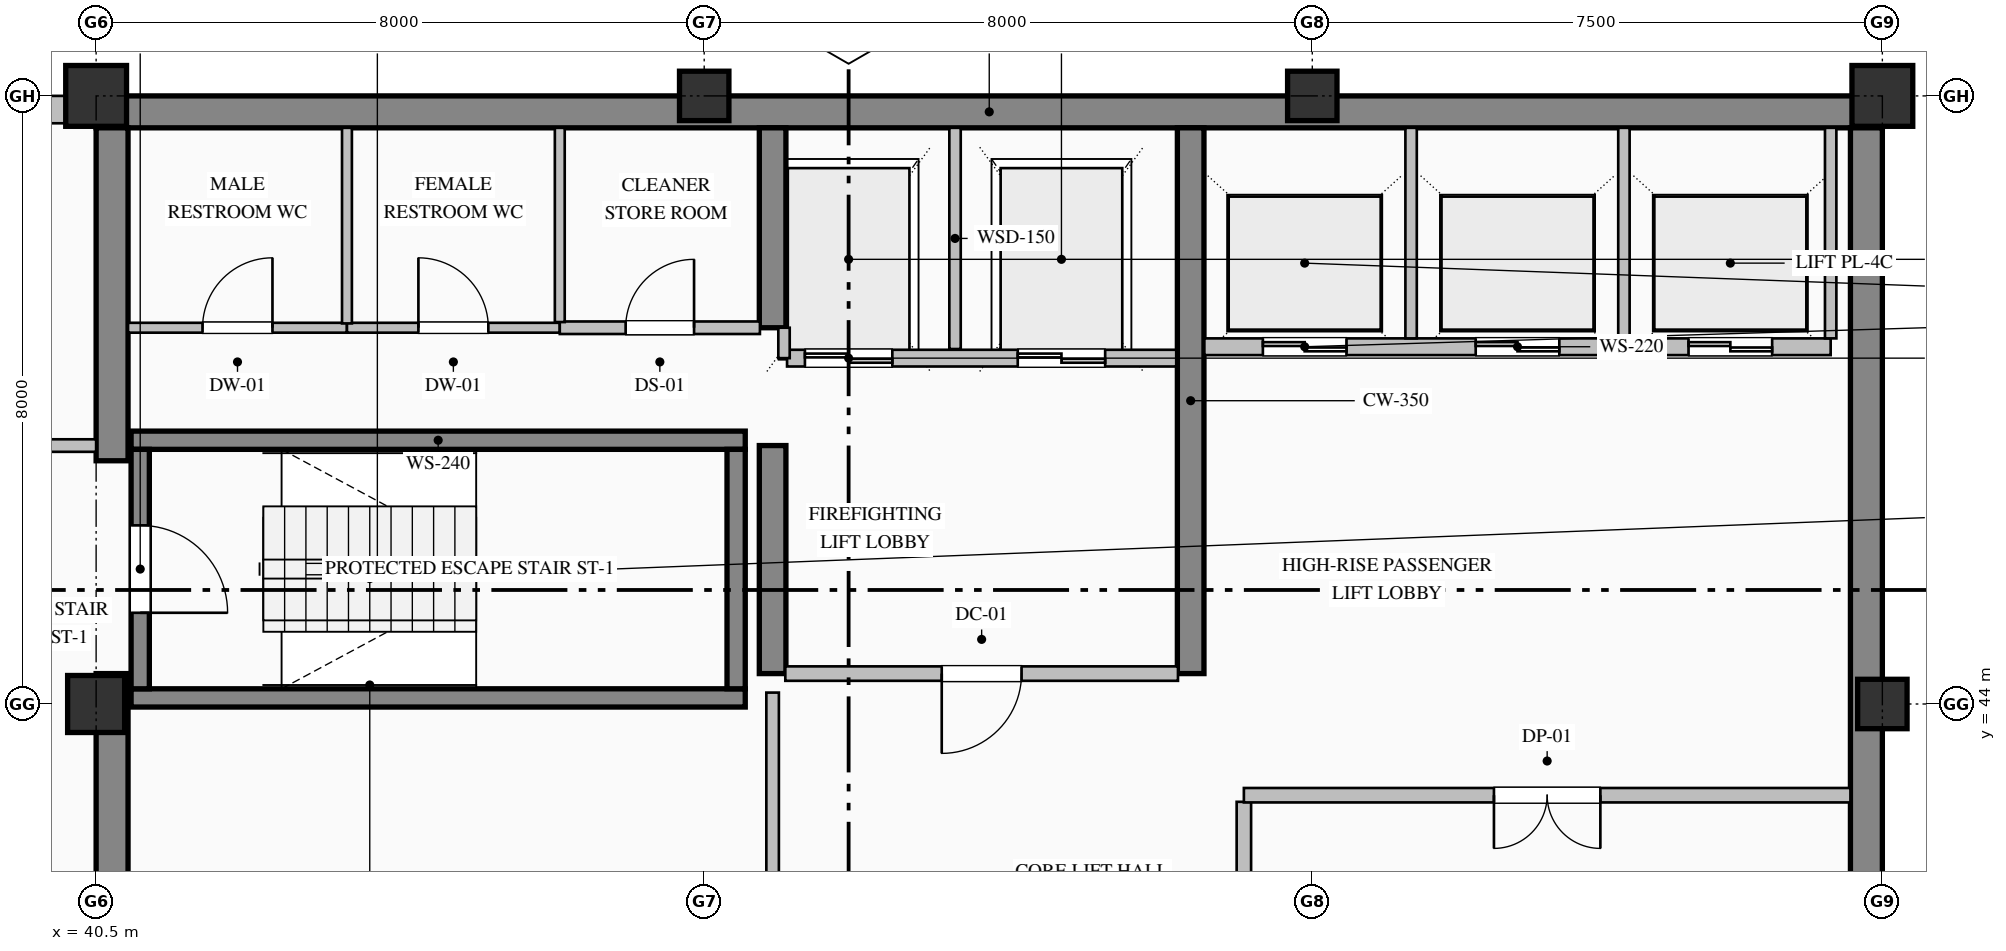
"""IFC4 building model, lengths in metres.
Left out: names, types, materials, properties, quantities, classifications, styles, units other than length and angle.
Written with IfcOpenShell. Run it as: python <this file> out.ifc"""

import sys

from ifc_helpers import new_model, si_unit, direction, frame, frame_2d, origin, origin_2d, place, context, subcontext, project, spatial, rectangle, hollow_rectangle, extrude, element, fill, save


model = new_model("IFC4")
c1 = context("Model", 3, precision=1e-05, world=origin(), true_north=direction((0.0, 1.0)))
c2 = subcontext(c1, "Body", "Model", "MODEL_VIEW")
j1 = project(units=[si_unit("LENGTHUNIT", "METRE"), si_unit("PLANEANGLEUNIT", "RADIAN")], contexts=[c1])
p1 = place(None, origin())
s1 = spatial("IfcSite", under=j1, at=p1, CompositionType="ELEMENT")
p2 = place(p1, origin())
s2 = spatial("IfcBuilding", under=s1, at=p2, CompositionType="ELEMENT")
p3 = place(p2, frame((0.0, 0.0, 303.2)))
s3 = spatial("IfcBuildingStorey", under=s2, at=p3, CompositionType="ELEMENT", Elevation=303.2)
p4 = place(p3, frame((40.5, 51.79, 0.0), z_axis=(0.0, 0.0, 1.0), x_axis=(1.0, 0.0, 0.0)))
e1 = element("IfcWall", 1, at=p4, inside=s3, PredefinedType="SHEAR", context=c2, shape_type="SweptSolid", body=[
    extrude(rectangle(XDim=23.5, YDim=0.42, at=frame_2d((11.75, 0.0))), origin(), (0.0, 0.0, 1.0), 3.785),
])
p5 = place(p3, frame((63.79, 36.32, 0.0), z_axis=(0.0, 0.0, 1.0), x_axis=(0.0, 1.0, 0.0)))
e2 = element("IfcWall", 2, at=p5, inside=s3, PredefinedType="SHEAR", context=c2, shape_type="SweptSolid", body=[
    extrude(rectangle(XDim=15.26, YDim=0.42, at=frame_2d((7.63, 0.0))), origin(), (0.0, 0.0, 1.0), 3.785),
])
p6 = place(p3, frame((40.71, 36.42, 0.0), z_axis=(0.0, 0.0, 1.0), x_axis=(0.0, 1.0, 0.0)))
e3 = element("IfcWall", 3, at=p6, inside=s3, PredefinedType="SHEAR", context=c2, shape_type="SweptSolid", body=[
    extrude(rectangle(XDim=7.98, YDim=0.42, at=frame_2d((3.99, 0.0))), origin(), (0.0, 0.0, 1.0), 3.785),
])
p7 = place(p3, frame((40.71, 47.2, 0.0), z_axis=(0.0, 0.0, 1.0), x_axis=(0.0, 1.0, 0.0)))
e4 = element("IfcWall", 4, at=p7, inside=s3, PredefinedType="SHEAR", context=c2, shape_type="SweptSolid", body=[
    extrude(rectangle(XDim=4.38, YDim=0.42, at=frame_2d((2.19, 0.0))), origin(), (0.0, 0.0, 1.0), 3.785),
])
p8 = place(p3, frame((49.4, 44.4, 0.0), z_axis=(0.0, 0.0, 1.0), x_axis=(0.0, 1.0, 0.0)))
e5 = element("IfcWall", 5, at=p8, inside=s3, PredefinedType="SHEAR", context=c2, shape_type="SweptSolid", body=[
    extrude(rectangle(XDim=3.0, YDim=0.35, at=frame_2d((1.5, 0.0))), origin(), (0.0, 0.0, 1.0), 3.785),
])
p9 = place(p3, frame((49.4, 48.95, 0.0), z_axis=(0.0, 0.0, 1.0), x_axis=(0.0, 1.0, 0.0)))
e6 = element("IfcWall", 6, at=p9, inside=s3, PredefinedType="SHEAR", context=c2, shape_type="SweptSolid", body=[
    extrude(rectangle(XDim=2.63, YDim=0.35, at=frame_2d((1.315, 0.0))), origin(), (0.0, 0.0, 1.0), 3.785),
])
p10 = place(p3, frame((54.9, 44.4, 0.0), z_axis=(0.0, 0.0, 1.0), x_axis=(0.0, 1.0, 0.0)))
e7 = element("IfcWall", 7, at=p10, inside=s3, PredefinedType="SHEAR", context=c2, shape_type="SweptSolid", body=[
    extrude(rectangle(XDim=7.18, YDim=0.35, at=frame_2d((3.59, 0.0))), origin(), (0.0, 0.0, 1.0), 3.785),
])
p11 = place(p3, frame((40.5, 44.0, 0.0), z_axis=(0.0, 0.0, 1.0), x_axis=(1.0, 0.0, 0.0)))
e8 = element("IfcColumn", 8, at=p11, inside=s3, PredefinedType="COLUMN", context=c2, shape_type="SweptSolid", body=[
    extrude(rectangle(XDim=0.75, YDim=0.75, at=origin_2d()), origin(), (0.0, 0.0, 1.0), 4.0),
])
p12 = place(p3, frame((40.5, 52.0, 0.0), z_axis=(0.0, 0.0, 1.0), x_axis=(1.0, 0.0, 0.0)))
e9 = element("IfcColumn", 9, at=p12, inside=s3, PredefinedType="COLUMN", context=c2, shape_type="SweptSolid", body=[
    extrude(hollow_rectangle(XDim=0.8, YDim=0.8, WallThickness=0.032, at=origin_2d()), origin(), (0.0, 0.0, 1.0), 4.0),
])
for number, where, z_axis, x_axis in (
    (10, (48.5, 52.0, 0.0), (0.0, 0.0, 1.0), (1.0, 0.0, 0.0)),
    (11, (56.5, 52.0, 0.0), (0.0, 0.0, 1.0), (1.0, 0.0, 0.0)),
    (12, (64.0, 44.0, 0.0), (0.0, 0.0, 1.0), (1.0, 0.0, 0.0)),
):
    element("IfcColumn", number, at=place(p3, frame(where, z_axis=z_axis, x_axis=x_axis)), inside=s3, PredefinedType="COLUMN", context=c2, shape_type="SweptSolid", body=[
        extrude(hollow_rectangle(XDim=0.65, YDim=0.65, WallThickness=0.028, at=origin_2d()), origin(), (0.0, 0.0, 1.0), 4.0),
    ])
p13 = place(p3, frame((64.0, 52.0, 0.0), z_axis=(0.0, 0.0, 1.0), x_axis=(1.0, 0.0, 0.0)))
e13 = element("IfcColumn", 13, at=p13, inside=s3, PredefinedType="COLUMN", context=c2, shape_type="SweptSolid", body=[
    extrude(hollow_rectangle(XDim=0.8, YDim=0.8, WallThickness=0.032, at=origin_2d()), origin(), (0.0, 0.0, 1.0), 4.0),
])
p14 = place(p3, frame((20.5, 51.82, 0.0), z_axis=(0.0, 0.0, 1.0), x_axis=(1.0, 0.0, 0.0)))
e14 = element("IfcWall", 14, at=p14, inside=s3, PredefinedType="SOLIDWALL", context=c2, shape_type="SweptSolid", body=[
    extrude(rectangle(XDim=20.02, YDim=0.36, at=frame_2d((10.01, 0.0))), origin(), (0.0, 0.0, 1.0), 3.335),
])
p15 = place(p14, frame((6.675, 0.0, 0.8)))
e15 = element("IfcOpeningElement", 15, at=p15, cuts=e14, PredefinedType="OPENING", context=c2, shape_type="SweptSolid", body=[
    extrude(rectangle(XDim=1.05, YDim=2.15, at=frame_2d((0.525, 1.075))), frame((0.0, 0.19, 0.0), z_axis=(0.0, -1.0, 0.0), x_axis=(1.0, 0.0, 0.0)), (0.0, 0.0, 1.0), 0.38),
])
for number, where, z_axis, x_axis in (
    (16, (40.96, 47.47, 0.0), (0.0, 0.0, 1.0), (1.0, 0.0, 0.0)),
    (17, (49.04, 44.08, 0.0), (0.0, 0.0, 1.0), (-1.0, 0.0, 0.0)),
):
    element("IfcWall", number, at=place(p3, frame(where, z_axis=z_axis, x_axis=x_axis)), inside=s3, PredefinedType="SOLIDWALL", context=c2, shape_type="SweptSolid", body=[
        extrude(rectangle(XDim=8.08, YDim=0.24, at=frame_2d((4.04, 0.0))), origin(), (0.0, 0.0, 1.0), 4.0),
    ])
p16 = place(p3, frame((41.08, 47.35, 0.0), z_axis=(0.0, 0.0, 1.0), x_axis=(0.0, -1.0, 0.0)))
e18 = element("IfcWall", 18, at=p16, inside=s3, PredefinedType="SOLIDWALL", context=c2, shape_type="SweptSolid", body=[
    extrude(rectangle(XDim=3.15, YDim=0.24, at=frame_2d((1.575, 0.0))), origin(), (0.0, 0.0, 1.0), 4.0),
])
p17 = place(p16, frame((1.0, 0.0, 0.0)))
e19 = element("IfcOpeningElement", 19, at=p17, cuts=e18, PredefinedType="OPENING", context=c2, shape_type="SweptSolid", body=[
    extrude(rectangle(XDim=1.15, YDim=2.2, at=frame_2d((0.575, 1.1))), frame((0.0, 0.13, 0.0), z_axis=(0.0, -1.0, 0.0), x_axis=(1.0, 0.0, 0.0)), (0.0, 0.0, 1.0), 0.26),
])
p18 = place(p3, frame((48.92, 44.2, 0.0), z_axis=(0.0, 0.0, 1.0), x_axis=(0.0, 1.0, 0.0)))
e20 = element("IfcWall", 20, at=p18, inside=s3, PredefinedType="SOLIDWALL", context=c2, shape_type="SweptSolid", body=[
    extrude(rectangle(XDim=3.15, YDim=0.24, at=frame_2d((1.575, 0.0))), origin(), (0.0, 0.0, 1.0), 4.0),
])
p19 = place(p3, frame((54.71, 48.55, 0.0), z_axis=(0.0, 0.0, 1.0), x_axis=(-1.0, 0.0, 0.0)))
e21 = element("IfcWall", 21, at=p19, inside=s3, PredefinedType="PARTITIONING", context=c2, shape_type="SweptSolid", body=[
    extrude(rectangle(XDim=5.12, YDim=0.22, at=frame_2d((2.56, 0.0))), origin(), (0.0, 0.0, 1.0), 3.785),
])
p20 = place(p19, frame((3.735, 0.0, 0.0)))
e22 = element("IfcOpeningElement", 22, at=p20, cuts=e21, PredefinedType="OPENING", context=c2, shape_type="SweptSolid", body=[
    extrude(rectangle(XDim=1.15, YDim=2.2, at=frame_2d((0.575, 1.1))), frame((0.0, 0.12, 0.0), z_axis=(0.0, -1.0, 0.0), x_axis=(1.0, 0.0, 0.0)), (0.0, 0.0, 1.0), 0.24),
])
p21 = place(p19, frame((0.935, 0.0, 0.0)))
e23 = element("IfcOpeningElement", 23, at=p21, cuts=e21, PredefinedType="OPENING", context=c2, shape_type="SweptSolid", body=[
    extrude(rectangle(XDim=1.15, YDim=2.2, at=frame_2d((0.575, 1.1))), frame((0.0, 0.12, 0.0), z_axis=(0.0, -1.0, 0.0), x_axis=(1.0, 0.0, 0.0)), (0.0, 0.0, 1.0), 0.24),
])
p22 = place(p3, frame((51.8, 48.67, 0.0), z_axis=(0.0, 0.0, 1.0), x_axis=(0.0, 1.0, 0.0)))
e24 = element("IfcWall", 24, at=p22, inside=s3, PredefinedType="PARTITIONING", context=c2, shape_type="SweptSolid", body=[
    extrude(rectangle(XDim=2.91, YDim=0.15, at=frame_2d((1.455, 0.0))), origin(), (0.0, 0.0, 1.0), 3.785),
])
p23 = place(p3, frame((49.55, 48.55, 0.0), z_axis=(0.0, 0.0, 1.0), x_axis=(0.0, 1.0, 0.0)))
e25 = element("IfcWall", 25, at=p23, inside=s3, PredefinedType="PARTITIONING", context=c2, shape_type="SweptSolid", body=[
    extrude(rectangle(XDim=0.4, YDim=0.15, at=frame_2d((0.2, 0.0))), origin(), (0.0, 0.0, 1.0), 3.785),
])
p24 = place(p3, frame((63.32, 48.7, 0.0), z_axis=(0.0, 0.0, 1.0), x_axis=(-1.0, 0.0, 0.0)))
e26 = element("IfcWall", 26, at=p24, inside=s3, PredefinedType="PARTITIONING", context=c2, shape_type="SweptSolid", body=[
    extrude(rectangle(XDim=8.24, YDim=0.22, at=frame_2d((4.12, 0.0))), origin(), (0.0, 0.0, 1.0), 3.785),
])
p25 = place(p24, frame((6.37, 0.0, 0.0)))
e27 = element("IfcOpeningElement", 27, at=p25, cuts=e26, PredefinedType="OPENING", context=c2, shape_type="SweptSolid", body=[
    extrude(rectangle(XDim=1.1, YDim=2.2, at=frame_2d((0.55, 1.1))), frame((0.0, 0.12, 0.0), z_axis=(0.0, -1.0, 0.0), x_axis=(1.0, 0.0, 0.0)), (0.0, 0.0, 1.0), 0.24),
])
p26 = place(p24, frame((3.57, 0.0, 0.0)))
e28 = element("IfcOpeningElement", 28, at=p26, cuts=e26, PredefinedType="OPENING", context=c2, shape_type="SweptSolid", body=[
    extrude(rectangle(XDim=1.1, YDim=2.2, at=frame_2d((0.55, 1.1))), frame((0.0, 0.12, 0.0), z_axis=(0.0, -1.0, 0.0), x_axis=(1.0, 0.0, 0.0)), (0.0, 0.0, 1.0), 0.24),
])
p27 = place(p24, frame((0.77, 0.0, 0.0)))
e29 = element("IfcOpeningElement", 29, at=p27, cuts=e26, PredefinedType="OPENING", context=c2, shape_type="SweptSolid", body=[
    extrude(rectangle(XDim=1.1, YDim=2.2, at=frame_2d((0.55, 1.1))), frame((0.0, 0.12, 0.0), z_axis=(0.0, -1.0, 0.0), x_axis=(1.0, 0.0, 0.0)), (0.0, 0.0, 1.0), 0.24),
])
for number, where, z_axis, x_axis in (
    (30, (57.8, 48.81, 0.0), (0.0, 0.0, 1.0), (0.0, 1.0, 0.0)),
    (31, (60.6, 48.81, 0.0), (0.0, 0.0, 1.0), (0.0, 1.0, 0.0)),
    (32, (63.32, 48.81, 0.0), (0.0, 0.0, 1.0), (0.0, 1.0, 0.0)),
):
    element("IfcWall", number, at=place(p3, frame(where, z_axis=z_axis, x_axis=x_axis)), inside=s3, PredefinedType="PARTITIONING", context=c2, shape_type="SweptSolid", body=[
        extrude(rectangle(XDim=2.77, YDim=0.15, at=frame_2d((1.385, 0.0))), origin(), (0.0, 0.0, 1.0), 3.785),
    ])
p28 = place(p3, frame((37.8, 47.4, 0.0), z_axis=(0.0, 0.0, 1.0), x_axis=(1.0, 0.0, 0.0)))
e33 = element("IfcWall", 33, at=p28, inside=s3, PredefinedType="PARTITIONING", context=c2, shape_type="SweptSolid", body=[
    extrude(rectangle(XDim=2.7, YDim=0.165, at=frame_2d((1.35, 0.0))), origin(), (0.0, 0.0, 1.0), 3.785),
])
p29 = place(p28, frame((0.825, 0.0, 0.0)))
e34 = element("IfcOpeningElement", 34, at=p29, cuts=e33, PredefinedType="OPENING", context=c2, shape_type="SweptSolid", body=[
    extrude(rectangle(XDim=1.05, YDim=2.15, at=frame_2d((0.525, 1.075))), frame((0.0, 0.093, 0.0), z_axis=(0.0, -1.0, 0.0), x_axis=(1.0, 0.0, 0.0)), (0.0, 0.0, 1.0), 0.185),
])
p30 = place(p3, frame((40.92, 48.95, 0.0), z_axis=(0.0, 0.0, 1.0), x_axis=(1.0, 0.0, 0.0)))
e35 = element("IfcWall", 35, at=p30, inside=s3, PredefinedType="PARTITIONING", context=c2, shape_type="SweptSolid", body=[
    extrude(rectangle(XDim=2.88, YDim=0.13, at=frame_2d((1.44, 0.0))), origin(), (0.0, 0.0, 1.0), 3.785),
])
p31 = place(p30, frame((0.98, 0.0, 0.0)))
e36 = element("IfcOpeningElement", 36, at=p31, cuts=e35, PredefinedType="OPENING", context=c2, shape_type="SweptSolid", body=[
    extrude(rectangle(XDim=0.92, YDim=2.15, at=frame_2d((0.46, 1.075))), frame((0.0, 0.075, 0.0), z_axis=(0.0, -1.0, 0.0), x_axis=(1.0, 0.0, 0.0)), (0.0, 0.0, 1.0), 0.15),
])
p32 = place(p3, frame((43.8, 48.95, 0.0), z_axis=(0.0, 0.0, 1.0), x_axis=(1.0, 0.0, 0.0)))
e37 = element("IfcWall", 37, at=p32, inside=s3, PredefinedType="PARTITIONING", context=c2, shape_type="SweptSolid", body=[
    extrude(rectangle(XDim=2.8, YDim=0.13, at=frame_2d((1.4, 0.0))), origin(), (0.0, 0.0, 1.0), 3.785),
])
p33 = place(p32, frame((0.94, 0.0, 0.0)))
e38 = element("IfcOpeningElement", 38, at=p33, cuts=e37, PredefinedType="OPENING", context=c2, shape_type="SweptSolid", body=[
    extrude(rectangle(XDim=0.92, YDim=2.15, at=frame_2d((0.46, 1.075))), frame((0.0, 0.075, 0.0), z_axis=(0.0, -1.0, 0.0), x_axis=(1.0, 0.0, 0.0)), (0.0, 0.0, 1.0), 0.15),
])
p34 = place(p3, frame((46.6, 48.95, 0.0), z_axis=(0.0, 0.0, 1.0), x_axis=(1.0, 0.0, 0.0)))
e39 = element("IfcWall", 39, at=p34, inside=s3, PredefinedType="PARTITIONING", context=c2, shape_type="SweptSolid", body=[
    extrude(rectangle(XDim=2.633, YDim=0.165, at=frame_2d((1.316, 0.0))), origin(), (0.0, 0.0, 1.0), 3.785),
])
p35 = place(p34, frame((0.866, 0.0, 0.0)))
e40 = element("IfcOpeningElement", 40, at=p35, cuts=e39, PredefinedType="OPENING", context=c2, shape_type="SweptSolid", body=[
    extrude(rectangle(XDim=0.9, YDim=2.15, at=frame_2d((0.45, 1.075))), frame((0.0, 0.093, 0.0), z_axis=(0.0, -1.0, 0.0), x_axis=(1.0, 0.0, 0.0)), (0.0, 0.0, 1.0), 0.185),
])
p36 = place(p3, frame((54.733, 44.4, 0.0), z_axis=(0.0, 0.0, 1.0), x_axis=(-1.0, 0.0, 0.0)))
e41 = element("IfcWall", 41, at=p36, inside=s3, PredefinedType="PARTITIONING", context=c2, shape_type="SweptSolid", body=[
    extrude(rectangle(XDim=5.166, YDim=0.19, at=frame_2d((2.583, 0.0))), origin(), (0.0, 0.0, 1.0), 3.785),
])
p37 = place(p36, frame((2.058, 0.0, 0.0)))
e42 = element("IfcOpeningElement", 42, at=p37, cuts=e41, PredefinedType="OPENING", context=c2, shape_type="SweptSolid", body=[
    extrude(rectangle(XDim=1.05, YDim=2.15, at=frame_2d((0.525, 1.075))), frame((0.0, 0.105, 0.0), z_axis=(0.0, -1.0, 0.0), x_axis=(1.0, 0.0, 0.0)), (0.0, 0.0, 1.0), 0.21),
])
p38 = place(p3, frame((49.4, 36.42, 0.0), z_axis=(0.0, 0.0, 1.0), x_axis=(0.0, 1.0, 0.0)))
e43 = element("IfcWall", 43, at=p38, inside=s3, PredefinedType="PARTITIONING", context=c2, shape_type="SweptSolid", body=[
    extrude(rectangle(XDim=7.73, YDim=0.165, at=frame_2d((3.865, 0.0))), origin(), (0.0, 0.0, 1.0), 3.027),
])
p39 = place(p38, frame((3.365, 0.0, 0.0)))
e44 = element("IfcOpeningElement", 44, at=p39, cuts=e43, PredefinedType="OPENING", context=c2, shape_type="SweptSolid", body=[
    extrude(rectangle(XDim=1.0, YDim=2.15, at=frame_2d((0.5, 1.075))), frame((0.0, 0.093, 0.0), z_axis=(0.0, -1.0, 0.0), x_axis=(1.0, 0.0, 0.0)), (0.0, 0.0, 1.0), 0.185),
])
p40 = place(p3, frame((55.6, 42.713, 0.0), z_axis=(0.0, 0.0, 1.0), x_axis=(0.0, -1.0, 0.0)))
e45 = element("IfcWall", 45, at=p40, inside=s3, PredefinedType="PARTITIONING", context=c2, shape_type="SweptSolid", body=[
    extrude(rectangle(XDim=2.731, YDim=0.19, at=frame_2d((1.365, 0.0))), origin(), (0.0, 0.0, 1.0), 3.785),
])
p41 = place(p3, frame((63.58, 42.8, 0.0), z_axis=(0.0, 0.0, 1.0), x_axis=(-1.0, 0.0, 0.0)))
e46 = element("IfcWall", 46, at=p41, inside=s3, PredefinedType="PARTITIONING", context=c2, shape_type="SweptSolid", body=[
    extrude(rectangle(XDim=7.98, YDim=0.19, at=frame_2d((3.99, 0.0))), origin(), (0.0, 0.0, 1.0), 3.785),
])
p42 = place(p41, frame((3.29, 0.0, 0.0)))
e47 = element("IfcOpeningElement", 47, at=p42, cuts=e46, PredefinedType="OPENING", context=c2, shape_type="SweptSolid", body=[
    extrude(rectangle(XDim=1.4, YDim=2.25, at=frame_2d((0.7, 1.125))), frame((0.0, 0.105, 0.0), z_axis=(0.0, -1.0, 0.0), x_axis=(1.0, 0.0, 0.0)), (0.0, 0.0, 1.0), 0.21),
])
p43 = place(p3, frame((43.8, 51.58, 0.0), z_axis=(0.0, 0.0, 1.0), x_axis=(0.0, -1.0, 0.0)))
e48 = element("IfcWall", 48, at=p43, inside=s3, PredefinedType="PARTITIONING", context=c2, shape_type="SweptSolid", body=[
    extrude(rectangle(XDim=2.573, YDim=0.13, at=frame_2d((1.287, 0.0))), origin(), (0.0, 0.0, 1.0), 3.785),
])
p44 = place(p3, frame((46.6, 51.58, 0.0), z_axis=(0.0, 0.0, 1.0), x_axis=(0.0, -1.0, 0.0)))
e49 = element("IfcWall", 49, at=p44, inside=s3, PredefinedType="PARTITIONING", context=c2, shape_type="SweptSolid", body=[
    extrude(rectangle(XDim=2.556, YDim=0.13, at=frame_2d((1.278, 0.0))), origin(), (0.0, 0.0, 1.0), 3.785),
])
p45 = place(p17, origin())
e50 = element("IfcDoor", 50, at=p45, inside=s3, OperationType="SINGLE_SWING_RIGHT", PredefinedType="DOOR", context=c2, shape_type="SweptSolid", body=[
    extrude(rectangle(XDim=1.15, YDim=2.2, at=frame_2d((0.575, 1.1))), frame((0.0, 0.025, 0.0), z_axis=(0.0, -1.0, 0.0), x_axis=(1.0, 0.0, 0.0)), (0.0, 0.0, 1.0), 0.05),
])
fill(e19, e50)
p46 = place(p20, origin())
e51 = element("IfcDoor", 51, at=p46, inside=s3, OperationType="DOUBLE_DOOR_SLIDING", PredefinedType="DOOR", context=c2, shape_type="SweptSolid", body=[
    extrude(rectangle(XDim=1.15, YDim=2.2, at=frame_2d((0.575, 1.1))), frame((0.0, 0.025, 0.0), z_axis=(0.0, -1.0, 0.0), x_axis=(1.0, 0.0, 0.0)), (0.0, 0.0, 1.0), 0.05),
])
fill(e22, e51)
p47 = place(p21, origin())
e52 = element("IfcDoor", 52, at=p47, inside=s3, OperationType="DOUBLE_DOOR_SLIDING", PredefinedType="DOOR", context=c2, shape_type="SweptSolid", body=[
    extrude(rectangle(XDim=1.15, YDim=2.2, at=frame_2d((0.575, 1.1))), frame((0.0, 0.025, 0.0), z_axis=(0.0, -1.0, 0.0), x_axis=(1.0, 0.0, 0.0)), (0.0, 0.0, 1.0), 0.05),
])
fill(e23, e52)
p48 = place(p25, origin())
e53 = element("IfcDoor", 53, at=p48, inside=s3, OperationType="DOUBLE_DOOR_SLIDING", PredefinedType="DOOR", context=c2, shape_type="SweptSolid", body=[
    extrude(rectangle(XDim=1.1, YDim=2.2, at=frame_2d((0.55, 1.1))), frame((0.0, 0.025, 0.0), z_axis=(0.0, -1.0, 0.0), x_axis=(1.0, 0.0, 0.0)), (0.0, 0.0, 1.0), 0.05),
])
fill(e27, e53)
p49 = place(p26, origin())
e54 = element("IfcDoor", 54, at=p49, inside=s3, OperationType="DOUBLE_DOOR_SLIDING", PredefinedType="DOOR", context=c2, shape_type="SweptSolid", body=[
    extrude(rectangle(XDim=1.1, YDim=2.2, at=frame_2d((0.55, 1.1))), frame((0.0, 0.025, 0.0), z_axis=(0.0, -1.0, 0.0), x_axis=(1.0, 0.0, 0.0)), (0.0, 0.0, 1.0), 0.05),
])
fill(e28, e54)
p50 = place(p27, origin())
e55 = element("IfcDoor", 55, at=p50, inside=s3, OperationType="DOUBLE_DOOR_SLIDING", PredefinedType="DOOR", context=c2, shape_type="SweptSolid", body=[
    extrude(rectangle(XDim=1.1, YDim=2.2, at=frame_2d((0.55, 1.1))), frame((0.0, 0.025, 0.0), z_axis=(0.0, -1.0, 0.0), x_axis=(1.0, 0.0, 0.0)), (0.0, 0.0, 1.0), 0.05),
])
fill(e29, e55)
p51 = place(p37, origin())
e56 = element("IfcDoor", 56, at=p51, inside=s3, OperationType="SINGLE_SWING_RIGHT", PredefinedType="DOOR", context=c2, shape_type="SweptSolid", body=[
    extrude(rectangle(XDim=1.05, YDim=2.15, at=frame_2d((0.525, 1.075))), frame((0.0, 0.025, 0.0), z_axis=(0.0, -1.0, 0.0), x_axis=(1.0, 0.0, 0.0)), (0.0, 0.0, 1.0), 0.05),
])
fill(e42, e56)
p52 = place(p31, origin())
e57 = element("IfcDoor", 57, at=p52, inside=s3, OperationType="SINGLE_SWING_RIGHT", PredefinedType="DOOR", context=c2, shape_type="SweptSolid", body=[
    extrude(rectangle(XDim=0.92, YDim=2.15, at=frame_2d((0.46, 1.075))), frame((0.0, 0.025, 0.0), z_axis=(0.0, -1.0, 0.0), x_axis=(1.0, 0.0, 0.0)), (0.0, 0.0, 1.0), 0.05),
])
fill(e36, e57)
p53 = place(p33, origin())
e58 = element("IfcDoor", 58, at=p53, inside=s3, OperationType="SINGLE_SWING_LEFT", PredefinedType="DOOR", context=c2, shape_type="SweptSolid", body=[
    extrude(rectangle(XDim=0.92, YDim=2.15, at=frame_2d((0.46, 1.075))), frame((0.0, 0.025, 0.0), z_axis=(0.0, -1.0, 0.0), x_axis=(1.0, 0.0, 0.0)), (0.0, 0.0, 1.0), 0.05),
])
fill(e38, e58)
p54 = place(p35, origin())
e59 = element("IfcDoor", 59, at=p54, inside=s3, OperationType="SINGLE_SWING_RIGHT", PredefinedType="DOOR", context=c2, shape_type="SweptSolid", body=[
    extrude(rectangle(XDim=0.9, YDim=2.15, at=frame_2d((0.45, 1.075))), frame((0.0, 0.025, 0.0), z_axis=(0.0, -1.0, 0.0), x_axis=(1.0, 0.0, 0.0)), (0.0, 0.0, 1.0), 0.05),
])
fill(e40, e59)
p55 = place(p42, origin())
e60 = element("IfcDoor", 60, at=p55, inside=s3, OperationType="DOUBLE_DOOR_SINGLE_SWING", PredefinedType="DOOR", context=c2, shape_type="SweptSolid", body=[
    extrude(rectangle(XDim=1.4, YDim=2.25, at=frame_2d((0.7, 1.125))), frame((0.0, 0.025, 0.0), z_axis=(0.0, -1.0, 0.0), x_axis=(1.0, 0.0, 0.0)), (0.0, 0.0, 1.0), 0.05),
])
fill(e47, e60)
save(model, sys.argv[1])
